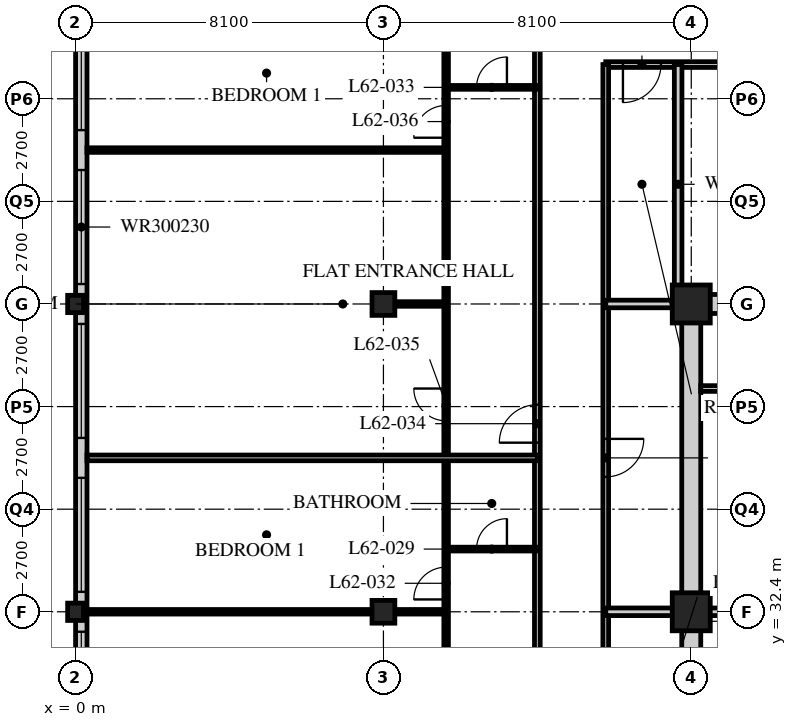
"""IFC4 building model, lengths in metres.
Left out: names, types, materials, properties, quantities, classifications, styles, units other than length and angle.
Written with IfcOpenShell. Run it as: python <this file> out.ifc"""

import sys

from ifc_helpers import new_model, si_unit, direction, frame, frame_2d, origin, origin_2d, place, context, subcontext, project, spatial, rectangle, hollow_rectangle, i_section, extrude, element, fill, save


model = new_model("IFC4")
c1 = context("Model", 3, precision=1e-05, world=origin(), true_north=direction((0.0, 1.0)))
c2 = subcontext(c1, "Body", "Model", "MODEL_VIEW")
j1 = project(units=[si_unit("LENGTHUNIT", "METRE"), si_unit("PLANEANGLEUNIT", "RADIAN")], contexts=[c1])
p1 = place(None, origin())
s1 = spatial("IfcSite", under=j1, at=p1, CompositionType="ELEMENT")
p2 = place(p1, origin())
s2 = spatial("IfcBuilding", under=s1, at=p2, CompositionType="ELEMENT")
p3 = place(p2, frame((0.0, 0.0, 242.4)))
s3 = spatial("IfcBuildingStorey", under=s2, at=p3, CompositionType="ELEMENT", Elevation=242.4)
for number, where, z_axis, x_axis in (
    (1, (0.0, 32.4, 0.0), (0.0, 0.0, 1.0), (1.0, 0.0, 0.0)),
    (2, (0.0, 40.5, 0.0), (0.0, 0.0, 1.0), (1.0, 0.0, 0.0)),
):
    element("IfcColumn", number, at=place(p3, frame(where, z_axis=z_axis, x_axis=x_axis)), inside=s3, PredefinedType="COLUMN", context=c2, shape_type="SweptSolid", body=[
        extrude(i_section(OverallWidth=0.418, OverallDepth=0.456, WebThickness=0.042, FlangeThickness=0.067, FilletRadius=0.015, at=origin_2d()), origin(), (0.0, 0.0, 1.0), 3.9),
    ])
for number, where, z_axis, x_axis in (
    (3, (8.1, 32.4, 0.0), (0.0, 0.0, 1.0), (1.0, 0.0, 0.0)),
    (4, (8.1, 40.5, 0.0), (0.0, 0.0, 1.0), (1.0, 0.0, 0.0)),
):
    element("IfcColumn", number, at=place(p3, frame(where, z_axis=z_axis, x_axis=x_axis)), inside=s3, PredefinedType="COLUMN", context=c2, shape_type="SweptSolid", body=[
        extrude(hollow_rectangle(XDim=0.6, YDim=0.6, WallThickness=0.05, at=origin_2d()), origin(), (0.0, 0.0, 1.0), 3.9),
    ])
for number, where, z_axis, x_axis in (
    (5, (16.2, 32.4, 0.0), (0.0, 0.0, 1.0), (1.0, 0.0, 0.0)),
    (6, (16.2, 40.5, 0.0), (0.0, 0.0, 1.0), (1.0, 0.0, 0.0)),
):
    element("IfcColumn", number, at=place(p3, frame(where, z_axis=z_axis, x_axis=x_axis)), inside=s3, PredefinedType="COLUMN", context=c2, shape_type="SweptSolid", body=[
        extrude(hollow_rectangle(XDim=1.0, YDim=1.0, WallThickness=0.1, at=origin_2d()), origin(), (0.0, 0.0, 1.0), 3.9),
    ])
p4 = place(p3, frame((0.15, 56.4, 0.0), z_axis=(0.0, 0.0, 1.0), x_axis=(0.0, -1.0, 0.0)))
e7 = element("IfcWall", 7, at=p4, inside=s3, PredefinedType="SOLIDWALL", context=c2, shape_type="SweptSolid", body=[
    extrude(rectangle(XDim=32.1, YDim=0.3, at=frame_2d((16.05, 0.0))), origin(), (0.0, 0.0, 1.0), 3.69),
])
p5 = place(p4, frame((0.225, 0.0, 0.6)))
e8 = element("IfcOpeningElement", 8, at=p5, cuts=e7, PredefinedType="OPENING", context=c2, shape_type="SweptSolid", body=[
    extrude(rectangle(XDim=3.0, YDim=2.3, at=frame_2d((1.5, 1.15))), frame((0.0, 0.16, 0.0), z_axis=(0.0, -1.0, 0.0), x_axis=(1.0, 0.0, 0.0)), (0.0, 0.0, 1.0), 0.32),
])
p6 = place(p4, frame((4.275, 0.0, 0.6)))
e9 = element("IfcOpeningElement", 9, at=p6, cuts=e7, PredefinedType="OPENING", context=c2, shape_type="SweptSolid", body=[
    extrude(rectangle(XDim=3.0, YDim=2.3, at=frame_2d((1.5, 1.15))), frame((0.0, 0.16, 0.0), z_axis=(0.0, -1.0, 0.0), x_axis=(1.0, 0.0, 0.0)), (0.0, 0.0, 1.0), 0.32),
])
p7 = place(p4, frame((8.325, 0.0, 0.6)))
e10 = element("IfcOpeningElement", 10, at=p7, cuts=e7, PredefinedType="OPENING", context=c2, shape_type="SweptSolid", body=[
    extrude(rectangle(XDim=3.0, YDim=2.3, at=frame_2d((1.5, 1.15))), frame((0.0, 0.16, 0.0), z_axis=(0.0, -1.0, 0.0), x_axis=(1.0, 0.0, 0.0)), (0.0, 0.0, 1.0), 0.32),
])
p8 = place(p4, frame((12.375, 0.0, 0.6)))
e11 = element("IfcOpeningElement", 11, at=p8, cuts=e7, PredefinedType="OPENING", context=c2, shape_type="SweptSolid", body=[
    extrude(rectangle(XDim=3.0, YDim=2.3, at=frame_2d((1.5, 1.15))), frame((0.0, 0.16, 0.0), z_axis=(0.0, -1.0, 0.0), x_axis=(1.0, 0.0, 0.0)), (0.0, 0.0, 1.0), 0.32),
])
p9 = place(p4, frame((16.425, 0.0, 0.6)))
e12 = element("IfcOpeningElement", 12, at=p9, cuts=e7, PredefinedType="OPENING", context=c2, shape_type="SweptSolid", body=[
    extrude(rectangle(XDim=3.0, YDim=2.3, at=frame_2d((1.5, 1.15))), frame((0.0, 0.16, 0.0), z_axis=(0.0, -1.0, 0.0), x_axis=(1.0, 0.0, 0.0)), (0.0, 0.0, 1.0), 0.32),
])
p10 = place(p4, frame((20.475, 0.0, 0.6)))
e13 = element("IfcOpeningElement", 13, at=p10, cuts=e7, PredefinedType="OPENING", context=c2, shape_type="SweptSolid", body=[
    extrude(rectangle(XDim=3.0, YDim=2.3, at=frame_2d((1.5, 1.15))), frame((0.0, 0.16, 0.0), z_axis=(0.0, -1.0, 0.0), x_axis=(1.0, 0.0, 0.0)), (0.0, 0.0, 1.0), 0.32),
])
p11 = place(p4, frame((24.525, 0.0, 0.6)))
e14 = element("IfcOpeningElement", 14, at=p11, cuts=e7, PredefinedType="OPENING", context=c2, shape_type="SweptSolid", body=[
    extrude(rectangle(XDim=3.0, YDim=2.3, at=frame_2d((1.5, 1.15))), frame((0.0, 0.16, 0.0), z_axis=(0.0, -1.0, 0.0), x_axis=(1.0, 0.0, 0.0)), (0.0, 0.0, 1.0), 0.32),
])
p12 = place(p4, frame((28.575, 0.0, 0.6)))
e15 = element("IfcOpeningElement", 15, at=p12, cuts=e7, PredefinedType="OPENING", context=c2, shape_type="SweptSolid", body=[
    extrude(rectangle(XDim=3.0, YDim=2.3, at=frame_2d((1.5, 1.15))), frame((0.0, 0.16, 0.0), z_axis=(0.0, -1.0, 0.0), x_axis=(1.0, 0.0, 0.0)), (0.0, 0.0, 1.0), 0.32),
])
p13 = place(p3, frame((12.15, 22.5, 0.0), z_axis=(0.0, 0.0, 1.0), x_axis=(0.0, 1.0, 0.0)))
e16 = element("IfcWall", 16, at=p13, inside=s3, PredefinedType="PARTITIONING", context=c2, shape_type="SweptSolid", body=[
    extrude(rectangle(XDim=26.1, YDim=0.15, at=frame_2d((13.05, 0.0))), origin(), (0.0, 0.0, 1.0), 3.69),
])
p14 = place(p13, frame((0.4, 0.0, 0.0)))
e17 = element("IfcOpeningElement", 17, at=p14, cuts=e16, PredefinedType="OPENING", context=c2, shape_type="SweptSolid", body=[
    extrude(rectangle(XDim=1.0, YDim=2.1, at=frame_2d((0.5, 1.05))), frame((0.0, 0.085, 0.0), z_axis=(0.0, -1.0, 0.0), x_axis=(1.0, 0.0, 0.0)), (0.0, 0.0, 1.0), 0.17),
])
p15 = place(p13, frame((14.35, 0.0, 0.0)))
e18 = element("IfcOpeningElement", 18, at=p15, cuts=e16, PredefinedType="OPENING", context=c2, shape_type="SweptSolid", body=[
    extrude(rectangle(XDim=1.0, YDim=2.1, at=frame_2d((0.5, 1.05))), frame((0.0, 0.085, 0.0), z_axis=(0.0, -1.0, 0.0), x_axis=(1.0, 0.0, 0.0)), (0.0, 0.0, 1.0), 0.17),
])
p16 = place(p3, frame((27.14, 46.8, 0.0), z_axis=(0.0, 0.0, 1.0), x_axis=(-1.0, 0.0, 0.0)))
e19 = element("IfcWall", 19, at=p16, inside=s3, PredefinedType="PARTITIONING", context=c2, shape_type="SweptSolid", body=[
    extrude(rectangle(XDim=13.19, YDim=0.15, at=frame_2d((6.595, 0.0))), origin(), (0.0, 0.0, 1.0), 3.69),
])
p17 = place(p16, frame((11.738, 0.0, 0.0)))
e20 = element("IfcOpeningElement", 20, at=p17, cuts=e19, PredefinedType="OPENING", context=c2, shape_type="SweptSolid", body=[
    extrude(rectangle(XDim=1.0, YDim=2.1, at=frame_2d((0.5, 1.05))), frame((0.0, 0.085, 0.0), z_axis=(0.0, -1.0, 0.0), x_axis=(1.0, 0.0, 0.0)), (0.0, 0.0, 1.0), 0.17),
])
p18 = place(p16, frame((5.138, 0.0, 0.0)))
e21 = element("IfcOpeningElement", 21, at=p18, cuts=e19, PredefinedType="OPENING", context=c2, shape_type="SweptSolid", body=[
    extrude(rectangle(XDim=1.0, YDim=2.1, at=frame_2d((0.5, 1.05))), frame((0.0, 0.085, 0.0), z_axis=(0.0, -1.0, 0.0), x_axis=(1.0, 0.0, 0.0)), (0.0, 0.0, 1.0), 0.17),
])
p19 = place(p3, frame((13.95, 46.8, 0.0), z_axis=(0.0, 0.0, 1.0), x_axis=(0.0, -1.0, 0.0)))
e22 = element("IfcWall", 22, at=p19, inside=s3, PredefinedType="PARTITIONING", context=c2, shape_type="SweptSolid", body=[
    extrude(rectangle(XDim=22.5, YDim=0.15, at=frame_2d((11.25, 0.0))), origin(), (0.0, 0.0, 1.0), 3.69),
])
p20 = place(p19, frame((17.95, 0.0, 0.0)))
e23 = element("IfcOpeningElement", 23, at=p20, cuts=e22, PredefinedType="OPENING", context=c2, shape_type="SweptSolid", body=[
    extrude(rectangle(XDim=1.0, YDim=2.1, at=frame_2d((0.5, 1.05))), frame((0.0, 0.085, 0.0), z_axis=(0.0, -1.0, 0.0), x_axis=(1.0, 0.0, 0.0)), (0.0, 0.0, 1.0), 0.17),
])
p21 = place(p19, frame((9.85, 0.0, 0.0)))
e24 = element("IfcOpeningElement", 24, at=p21, cuts=e22, PredefinedType="OPENING", context=c2, shape_type="SweptSolid", body=[
    extrude(rectangle(XDim=1.0, YDim=2.1, at=frame_2d((0.5, 1.05))), frame((0.0, 0.085, 0.0), z_axis=(0.0, -1.0, 0.0), x_axis=(1.0, 0.0, 0.0)), (0.0, 0.0, 1.0), 0.17),
])
p22 = place(p3, frame((13.95, 32.4, 0.0), z_axis=(0.0, 0.0, 1.0), x_axis=(1.0, 0.0, 0.0)))
e25 = element("IfcWall", 25, at=p22, inside=s3, PredefinedType="SOLIDWALL", context=c2, shape_type="SweptSolid", body=[
    extrude(rectangle(XDim=2.25, YDim=0.2, at=frame_2d((1.125, 0.0))), origin(), (0.0, 0.0, 1.0), 2.928),
])
p23 = place(p3, frame((15.855, 46.8, 0.0), z_axis=(0.0, 0.0, 1.0), x_axis=(0.0, -1.0, 0.0)))
e26 = element("IfcWall", 26, at=p23, inside=s3, PredefinedType="SOLIDWALL", context=c2, shape_type="SweptSolid", body=[
    extrude(rectangle(XDim=6.3, YDim=0.2, at=frame_2d((3.15, 0.0))), origin(), (0.0, 0.0, 1.0), 3.69),
])
p24 = place(p3, frame((13.95, 40.5, 0.0), z_axis=(0.0, 0.0, 1.0), x_axis=(1.0, 0.0, 0.0)))
e27 = element("IfcWall", 27, at=p24, inside=s3, PredefinedType="SOLIDWALL", context=c2, shape_type="SweptSolid", body=[
    extrude(rectangle(XDim=2.25, YDim=0.2, at=frame_2d((1.125, 0.0))), origin(), (0.0, 0.0, 1.0), 2.928),
])
p25 = place(p3, frame((9.75, 22.5, 0.0), z_axis=(0.0, 0.0, 1.0), x_axis=(0.0, 1.0, 0.0)))
e28 = element("IfcWall", 28, at=p25, inside=s3, PredefinedType="PARTITIONING", context=c2, shape_type="SweptSolid", body=[
    extrude(rectangle(XDim=26.1, YDim=0.12, at=frame_2d((13.05, 0.0))), origin(), (0.0, 0.0, 1.0), 3.69),
])
p26 = place(p25, frame((0.975, 0.0, 0.0)))
e29 = element("IfcOpeningElement", 29, at=p26, cuts=e28, PredefinedType="OPENING", context=c2, shape_type="SweptSolid", body=[
    extrude(rectangle(XDim=0.85, YDim=2.1, at=frame_2d((0.425, 1.05))), frame((0.0, 0.07, 0.0), z_axis=(0.0, -1.0, 0.0), x_axis=(1.0, 0.0, 0.0)), (0.0, 0.0, 1.0), 0.14),
])
p27 = place(p25, frame((10.225, 0.0, 0.0)))
e30 = element("IfcOpeningElement", 30, at=p27, cuts=e28, PredefinedType="OPENING", context=c2, shape_type="SweptSolid", body=[
    extrude(rectangle(XDim=0.85, YDim=2.1, at=frame_2d((0.425, 1.05))), frame((0.0, 0.07, 0.0), z_axis=(0.0, -1.0, 0.0), x_axis=(1.0, 0.0, 0.0)), (0.0, 0.0, 1.0), 0.14),
])
p28 = place(p25, frame((14.925, 0.0, 0.0)))
e31 = element("IfcOpeningElement", 31, at=p28, cuts=e28, PredefinedType="OPENING", context=c2, shape_type="SweptSolid", body=[
    extrude(rectangle(XDim=0.85, YDim=2.1, at=frame_2d((0.425, 1.05))), frame((0.0, 0.07, 0.0), z_axis=(0.0, -1.0, 0.0), x_axis=(1.0, 0.0, 0.0)), (0.0, 0.0, 1.0), 0.14),
])
p29 = place(p25, frame((22.375, 0.0, 0.0)))
e32 = element("IfcOpeningElement", 32, at=p29, cuts=e28, PredefinedType="OPENING", context=c2, shape_type="SweptSolid", body=[
    extrude(rectangle(XDim=0.85, YDim=2.1, at=frame_2d((0.425, 1.05))), frame((0.0, 0.07, 0.0), z_axis=(0.0, -1.0, 0.0), x_axis=(1.0, 0.0, 0.0)), (0.0, 0.0, 1.0), 0.14),
])
p30 = place(p3, frame((12.15, 34.05, 0.0), z_axis=(0.0, 0.0, 1.0), x_axis=(-1.0, 0.0, 0.0)))
e33 = element("IfcWall", 33, at=p30, inside=s3, PredefinedType="PARTITIONING", context=c2, shape_type="SweptSolid", body=[
    extrude(rectangle(XDim=2.4, YDim=0.1, at=frame_2d((1.2, 0.0))), origin(), (0.0, 0.0, 1.0), 3.69),
])
p31 = place(p30, frame((0.8, 0.0, 0.0)))
e34 = element("IfcOpeningElement", 34, at=p31, cuts=e33, PredefinedType="OPENING", context=c2, shape_type="SweptSolid", body=[
    extrude(rectangle(XDim=0.8, YDim=2.1, at=frame_2d((0.4, 1.05))), frame((0.0, 0.06, 0.0), z_axis=(0.0, -1.0, 0.0), x_axis=(1.0, 0.0, 0.0)), (0.0, 0.0, 1.0), 0.12),
])
p32 = place(p3, frame((9.75, 32.4, 0.0), z_axis=(0.0, 0.0, 1.0), x_axis=(-1.0, 0.0, 0.0)))
e35 = element("IfcWall", 35, at=p32, inside=s3, PredefinedType="PARTITIONING", context=c2, shape_type="SweptSolid", body=[
    extrude(rectangle(XDim=9.45, YDim=0.12, at=frame_2d((4.725, 0.0))), origin(), (0.0, 0.0, 1.0), 2.928),
])
p33 = place(p3, frame((12.15, 36.45, 0.0), z_axis=(0.0, 0.0, 1.0), x_axis=(-1.0, 0.0, 0.0)))
e36 = element("IfcWall", 36, at=p33, inside=s3, PredefinedType="PARTITIONING", context=c2, shape_type="SweptSolid", body=[
    extrude(rectangle(XDim=11.85, YDim=0.15, at=frame_2d((5.925, 0.0))), origin(), (0.0, 0.0, 1.0), 3.69),
])
p34 = place(p3, frame((12.15, 46.2, 0.0), z_axis=(0.0, 0.0, 1.0), x_axis=(-1.0, 0.0, 0.0)))
e37 = element("IfcWall", 37, at=p34, inside=s3, PredefinedType="PARTITIONING", context=c2, shape_type="SweptSolid", body=[
    extrude(rectangle(XDim=2.4, YDim=0.1, at=frame_2d((1.2, 0.0))), origin(), (0.0, 0.0, 1.0), 3.69),
])
p35 = place(p34, frame((0.8, 0.0, 0.0)))
e38 = element("IfcOpeningElement", 38, at=p35, cuts=e37, PredefinedType="OPENING", context=c2, shape_type="SweptSolid", body=[
    extrude(rectangle(XDim=0.8, YDim=2.1, at=frame_2d((0.4, 1.05))), frame((0.0, 0.06, 0.0), z_axis=(0.0, -1.0, 0.0), x_axis=(1.0, 0.0, 0.0)), (0.0, 0.0, 1.0), 0.12),
])
p36 = place(p3, frame((9.75, 44.55, 0.0), z_axis=(0.0, 0.0, 1.0), x_axis=(-1.0, 0.0, 0.0)))
e39 = element("IfcWall", 39, at=p36, inside=s3, PredefinedType="PARTITIONING", context=c2, shape_type="SweptSolid", body=[
    extrude(rectangle(XDim=9.45, YDim=0.12, at=frame_2d((4.725, 0.0))), origin(), (0.0, 0.0, 1.0), 3.69),
])
p37 = place(p3, frame((9.75, 40.5, 0.0), z_axis=(0.0, 0.0, 1.0), x_axis=(-1.0, 0.0, 0.0)))
e40 = element("IfcWall", 40, at=p37, inside=s3, PredefinedType="PARTITIONING", context=c2, shape_type="SweptSolid", body=[
    extrude(rectangle(XDim=1.35, YDim=0.12, at=frame_2d((0.675, 0.0))), origin(), (0.0, 0.0, 1.0), 2.928),
])
p38 = place(p3, frame((15.95, 40.5, 0.0), z_axis=(0.0, 0.0, 1.0), x_axis=(1.0, 0.0, 0.0)))
e41 = element("IfcWall", 41, at=p38, inside=s3, PredefinedType="SOLIDWALL", context=c2, shape_type="SweptSolid", body=[
    extrude(rectangle(XDim=24.8, YDim=0.5, at=frame_2d((12.4, 0.0))), origin(), (0.0, 0.0, 1.0), 2.928),
])
p39 = place(p38, frame((11.5, 0.0, 0.0)))
e42 = element("IfcOpeningElement", 42, at=p39, cuts=e41, PredefinedType="OPENING", context=c2, shape_type="SweptSolid", body=[
    extrude(rectangle(XDim=1.8, YDim=2.4, at=frame_2d((0.9, 1.2))), frame((0.0, 0.26, 0.0), z_axis=(0.0, -1.0, 0.0), x_axis=(1.0, 0.0, 0.0)), (0.0, 0.0, 1.0), 0.52),
])
p40 = place(p3, frame((16.2, 24.55, 0.0), z_axis=(0.0, 0.0, 1.0), x_axis=(0.0, 1.0, 0.0)))
e43 = element("IfcWall", 43, at=p40, inside=s3, PredefinedType="SOLIDWALL", context=c2, shape_type="SweptSolid", body=[
    extrude(rectangle(XDim=15.7, YDim=0.5, at=frame_2d((7.85, 0.0))), origin(), (0.0, 0.0, 1.0), 2.928),
])
p41 = place(p3, frame((16.45, 32.4, 0.0), z_axis=(0.0, 0.0, 1.0), x_axis=(1.0, 0.0, 0.0)))
e44 = element("IfcWall", 44, at=p41, inside=s3, PredefinedType="SOLIDWALL", context=c2, shape_type="SweptSolid", body=[
    extrude(rectangle(XDim=7.95, YDim=0.2, at=frame_2d((3.975, 0.0))), origin(), (0.0, 0.0, 1.0), 3.078),
])
p42 = place(p3, frame((16.45, 38.275, 0.0), z_axis=(0.0, 0.0, 1.0), x_axis=(1.0, 0.0, 0.0)))
e45 = element("IfcWall", 45, at=p42, inside=s3, PredefinedType="PARTITIONING", context=c2, shape_type="SweptSolid", body=[
    extrude(rectangle(XDim=7.75, YDim=0.15, at=frame_2d((3.875, 0.0))), origin(), (0.0, 0.0, 1.0), 3.69),
])
p43 = place(p7, origin())
e46 = element("IfcWindow", 46, at=p43, inside=s3, PartitioningType="SINGLE_PANEL", PredefinedType="WINDOW", context=c2, shape_type="SweptSolid", body=[
    extrude(rectangle(XDim=3.0, YDim=2.3, at=frame_2d((1.5, 1.15))), frame((0.0, 0.03, 0.0), z_axis=(0.0, -1.0, 0.0), x_axis=(1.0, 0.0, 0.0)), (0.0, 0.0, 1.0), 0.06),
])
fill(e10, e46)
p44 = place(p8, origin())
e47 = element("IfcWindow", 47, at=p44, inside=s3, PartitioningType="SINGLE_PANEL", PredefinedType="WINDOW", context=c2, shape_type="SweptSolid", body=[
    extrude(rectangle(XDim=3.0, YDim=2.3, at=frame_2d((1.5, 1.15))), frame((0.0, 0.03, 0.0), z_axis=(0.0, -1.0, 0.0), x_axis=(1.0, 0.0, 0.0)), (0.0, 0.0, 1.0), 0.06),
])
fill(e11, e47)
p45 = place(p9, origin())
e48 = element("IfcWindow", 48, at=p45, inside=s3, PartitioningType="SINGLE_PANEL", PredefinedType="WINDOW", context=c2, shape_type="SweptSolid", body=[
    extrude(rectangle(XDim=3.0, YDim=2.3, at=frame_2d((1.5, 1.15))), frame((0.0, 0.03, 0.0), z_axis=(0.0, -1.0, 0.0), x_axis=(1.0, 0.0, 0.0)), (0.0, 0.0, 1.0), 0.06),
])
fill(e12, e48)
p46 = place(p10, origin())
e49 = element("IfcWindow", 49, at=p46, inside=s3, PartitioningType="SINGLE_PANEL", PredefinedType="WINDOW", context=c2, shape_type="SweptSolid", body=[
    extrude(rectangle(XDim=3.0, YDim=2.3, at=frame_2d((1.5, 1.15))), frame((0.0, 0.03, 0.0), z_axis=(0.0, -1.0, 0.0), x_axis=(1.0, 0.0, 0.0)), (0.0, 0.0, 1.0), 0.06),
])
fill(e13, e49)
p47 = place(p11, origin())
e50 = element("IfcWindow", 50, at=p47, inside=s3, PartitioningType="SINGLE_PANEL", PredefinedType="WINDOW", context=c2, shape_type="SweptSolid", body=[
    extrude(rectangle(XDim=3.0, YDim=2.3, at=frame_2d((1.5, 1.15))), frame((0.0, 0.03, 0.0), z_axis=(0.0, -1.0, 0.0), x_axis=(1.0, 0.0, 0.0)), (0.0, 0.0, 1.0), 0.06),
])
fill(e14, e50)
p48 = place(p21, origin())
e51 = element("IfcDoor", 51, at=p48, inside=s3, OperationType="SINGLE_SWING_LEFT", PredefinedType="DOOR", context=c2, shape_type="SweptSolid", body=[
    extrude(rectangle(XDim=1.0, YDim=2.1, at=frame_2d((0.5, 1.05))), frame((0.0, 0.025, 0.0), z_axis=(0.0, -1.0, 0.0), x_axis=(1.0, 0.0, 0.0)), (0.0, 0.0, 1.0), 0.05),
])
fill(e24, e51)
p49 = place(p17, origin())
e52 = element("IfcDoor", 52, at=p49, inside=s3, OperationType="SINGLE_SWING_RIGHT", PredefinedType="DOOR", context=c2, shape_type="SweptSolid", body=[
    extrude(rectangle(XDim=1.0, YDim=2.1, at=frame_2d((0.5, 1.05))), frame((0.0, 0.025, 0.0), z_axis=(0.0, -1.0, 0.0), x_axis=(1.0, 0.0, 0.0)), (0.0, 0.0, 1.0), 0.05),
])
fill(e20, e52)
p50 = place(p31, origin())
e53 = element("IfcDoor", 53, at=p50, inside=s3, OperationType="SINGLE_SWING_RIGHT", PredefinedType="DOOR", context=c2, shape_type="SweptSolid", body=[
    extrude(rectangle(XDim=0.8, YDim=2.1, at=frame_2d((0.4, 1.05))), frame((0.0, 0.025, 0.0), z_axis=(0.0, -1.0, 0.0), x_axis=(1.0, 0.0, 0.0)), (0.0, 0.0, 1.0), 0.05),
])
fill(e34, e53)
p51 = place(p27, origin())
e54 = element("IfcDoor", 54, at=p51, inside=s3, OperationType="SINGLE_SWING_LEFT", PredefinedType="DOOR", context=c2, shape_type="SweptSolid", body=[
    extrude(rectangle(XDim=0.85, YDim=2.1, at=frame_2d((0.425, 1.05))), frame((0.0, 0.025, 0.0), z_axis=(0.0, -1.0, 0.0), x_axis=(1.0, 0.0, 0.0)), (0.0, 0.0, 1.0), 0.05),
])
fill(e30, e54)
p52 = place(p35, origin())
e55 = element("IfcDoor", 55, at=p52, inside=s3, OperationType="SINGLE_SWING_RIGHT", PredefinedType="DOOR", context=c2, shape_type="SweptSolid", body=[
    extrude(rectangle(XDim=0.8, YDim=2.1, at=frame_2d((0.4, 1.05))), frame((0.0, 0.025, 0.0), z_axis=(0.0, -1.0, 0.0), x_axis=(1.0, 0.0, 0.0)), (0.0, 0.0, 1.0), 0.05),
])
fill(e38, e55)
p53 = place(p15, origin())
e56 = element("IfcDoor", 56, at=p53, inside=s3, OperationType="SINGLE_SWING_LEFT", PredefinedType="DOOR", context=c2, shape_type="SweptSolid", body=[
    extrude(rectangle(XDim=1.0, YDim=2.1, at=frame_2d((0.5, 1.05))), frame((0.0, 0.025, 0.0), z_axis=(0.0, -1.0, 0.0), x_axis=(1.0, 0.0, 0.0)), (0.0, 0.0, 1.0), 0.05),
])
fill(e18, e56)
p54 = place(p28, origin())
e57 = element("IfcDoor", 57, at=p54, inside=s3, OperationType="SINGLE_SWING_RIGHT", PredefinedType="DOOR", context=c2, shape_type="SweptSolid", body=[
    extrude(rectangle(XDim=0.85, YDim=2.1, at=frame_2d((0.425, 1.05))), frame((0.0, 0.025, 0.0), z_axis=(0.0, -1.0, 0.0), x_axis=(1.0, 0.0, 0.0)), (0.0, 0.0, 1.0), 0.05),
])
fill(e31, e57)
p55 = place(p29, origin())
e58 = element("IfcDoor", 58, at=p55, inside=s3, OperationType="SINGLE_SWING_LEFT", PredefinedType="DOOR", context=c2, shape_type="SweptSolid", body=[
    extrude(rectangle(XDim=0.85, YDim=2.1, at=frame_2d((0.425, 1.05))), frame((0.0, 0.025, 0.0), z_axis=(0.0, -1.0, 0.0), x_axis=(1.0, 0.0, 0.0)), (0.0, 0.0, 1.0), 0.05),
])
fill(e32, e58)
save(model, sys.argv[1])
